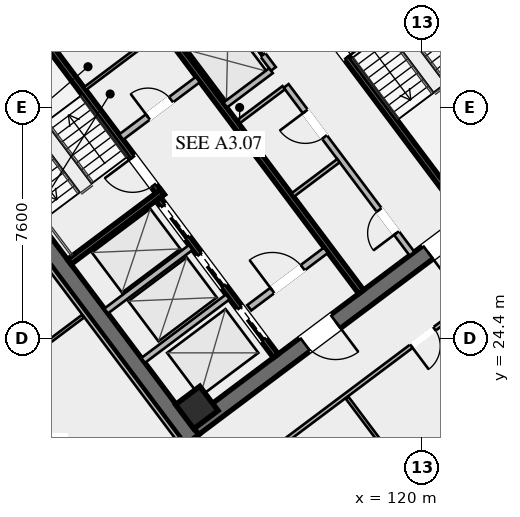
"""IFC4 building model, lengths in metres.
Left out: names, types, materials, properties, quantities, classifications, styles, units other than length and angle.
Written with IfcOpenShell. Run it as: python <this file> out.ifc"""

import sys

from ifc_helpers import new_model, si_unit, direction, frame, frame_2d, origin, origin_2d, place, context, subcontext, project, spatial, rectangle, hollow_rectangle, extrude, element, fill, save


model = new_model("IFC4")
c1 = context("Model", 3, precision=1e-05, world=origin(), true_north=direction((0.0, 1.0)))
c2 = subcontext(c1, "Body", "Model", "MODEL_VIEW")
j1 = project(units=[si_unit("LENGTHUNIT", "METRE"), si_unit("PLANEANGLEUNIT", "RADIAN")], contexts=[c1])
p1 = place(None, origin())
s1 = spatial("IfcSite", under=j1, at=p1, CompositionType="ELEMENT")
p2 = place(p1, origin())
s2 = spatial("IfcBuilding", under=s1, at=p2, CompositionType="ELEMENT")
p3 = place(p2, frame((0.0, 0.0, 157.0)))
s3 = spatial("IfcBuildingStorey", under=s2, at=p3, CompositionType="ELEMENT", Elevation=157.0)
for number, where, z_axis, x_axis in (
    (1, (112.436, 21.077, 0.0), (0.0, 0.0, 1.0), (-0.6, 0.8, 0.0)),
    (2, (115.564, 42.923, 0.0), (0.0, 0.0, 1.0), (0.6, -0.8, 0.0)),
):
    element("IfcWall", number, at=place(p3, frame(where, z_axis=z_axis, x_axis=x_axis)), inside=s3, PredefinedType="SHEAR", context=c2, shape_type="SweptSolid", body=[
        extrude(rectangle(XDim=15.6, YDim=0.55, at=frame_2d((7.8, 0.0))), origin(), (0.0, 0.0, 1.0), 3.55),
    ])
p4 = place(p3, frame((124.539, 30.498, 0.0), z_axis=(0.0, 0.0, 1.0), x_axis=(-0.799998054672, -0.600002593761, 0.0)))
e3 = element("IfcWall", 3, at=p4, inside=s3, PredefinedType="SHEAR", context=c2, shape_type="SweptSolid", body=[
    extrude(rectangle(XDim=15.06, YDim=0.55, at=frame_2d((7.53, 0.0))), origin(), (0.0, 0.0, 1.0), 3.55),
])
p5 = place(p4, frame((9.23, 0.0, 0.0)))
e4 = element("IfcOpeningElement", 4, at=p5, cuts=e3, PredefinedType="OPENING", context=c2, shape_type="SweptSolid", body=[
    extrude(rectangle(XDim=1.25, YDim=2.25, at=frame_2d((0.625, 1.125))), frame((0.0, 0.285, 0.0), z_axis=(0.0, -1.0, 0.0), x_axis=(1.0, 0.0, 0.0)), (0.0, 0.0, 1.0), 0.57),
])
p6 = place(p4, frame((4.18, 0.0, 0.0)))
e5 = element("IfcOpeningElement", 5, at=p6, cuts=e3, PredefinedType="OPENING", context=c2, shape_type="SweptSolid", body=[
    extrude(rectangle(XDim=1.25, YDim=2.25, at=frame_2d((0.625, 1.125))), frame((0.0, 0.285, 0.0), z_axis=(0.0, -1.0, 0.0), x_axis=(1.0, 0.0, 0.0)), (0.0, 0.0, 1.0), 0.57),
])
p7 = place(p3, frame((103.461, 33.502, 0.0), z_axis=(0.0, 0.0, 1.0), x_axis=(0.799998054672, 0.600002593761, 0.0)))
e6 = element("IfcWall", 6, at=p7, inside=s3, PredefinedType="SHEAR", context=c2, shape_type="SweptSolid", body=[
    extrude(rectangle(XDim=15.06, YDim=0.55, at=frame_2d((7.53, 0.0))), origin(), (0.0, 0.0, 1.0), 3.55),
])
p8 = place(p7, frame((4.58, 0.0, 0.0)))
e7 = element("IfcOpeningElement", 7, at=p8, cuts=e6, PredefinedType="OPENING", context=c2, shape_type="SweptSolid", body=[
    extrude(rectangle(XDim=1.25, YDim=2.25, at=frame_2d((0.625, 1.125))), frame((0.0, 0.285, 0.0), z_axis=(0.0, -1.0, 0.0), x_axis=(1.0, 0.0, 0.0)), (0.0, 0.0, 1.0), 0.57),
])
p9 = place(p7, frame((9.63, 0.0, 0.0)))
e8 = element("IfcOpeningElement", 8, at=p9, cuts=e6, PredefinedType="OPENING", context=c2, shape_type="SweptSolid", body=[
    extrude(rectangle(XDim=1.25, YDim=2.25, at=frame_2d((0.625, 1.125))), frame((0.0, 0.285, 0.0), z_axis=(0.0, -1.0, 0.0), x_axis=(1.0, 0.0, 0.0)), (0.0, 0.0, 1.0), 0.57),
])
p10 = place(p3, frame((112.59, 22.13, 0.0), z_axis=(0.0, 0.0, 1.0), x_axis=(0.799999996291, 0.600000004945, 0.0)))
e9 = element("IfcColumn", 9, at=p10, inside=s3, PredefinedType="COLUMN", context=c2, shape_type="SweptSolid", body=[
    extrude(hollow_rectangle(XDim=1.0, YDim=1.0, WallThickness=0.04, at=origin_2d()), origin(), (0.0, 0.0, 1.0), 3.37),
])
p11 = place(p3, frame((111.44, 29.08, 0.0), z_axis=(0.0, 0.0, 1.0), x_axis=(-0.59999029481, 0.8000072788, 0.0)))
e10 = element("IfcWall", 10, at=p11, inside=s3, PredefinedType="SHEAR", context=c2, shape_type="SweptSolid", body=[
    extrude(rectangle(XDim=8.05, YDim=0.2, at=frame_2d((4.025, 0.0))), origin(), (0.0, 0.0, 1.0), 3.37),
])
p12 = place(p11, frame((0.45, 0.0, 0.0)))
e11 = element("IfcOpeningElement", 11, at=p12, cuts=e10, PredefinedType="OPENING", context=c2, shape_type="SweptSolid", body=[
    extrude(rectangle(XDim=1.15, YDim=2.2, at=frame_2d((0.575, 1.1))), frame((0.0, 0.11, 0.0), z_axis=(0.0, -1.0, 0.0), x_axis=(1.0, 0.0, 0.0)), (0.0, 0.0, 1.0), 0.22),
])
p13 = place(p3, frame((108.396, 26.922, 0.0), z_axis=(0.0, 0.0, 1.0), x_axis=(0.800015298837, 0.599979601008, 0.0)))
e12 = element("IfcWall", 12, at=p13, inside=s3, PredefinedType="SHEAR", context=c2, shape_type="SweptSolid", body=[
    extrude(rectangle(XDim=3.83, YDim=0.2, at=frame_2d((1.915, 0.0))), origin(), (0.0, 0.0, 1.0), 3.37),
])
p14 = place(p3, frame((116.56, 34.92, 0.0), z_axis=(0.0, 0.0, 1.0), x_axis=(0.59999029481, -0.8000072788, 0.0)))
e13 = element("IfcWall", 13, at=p14, inside=s3, PredefinedType="SHEAR", context=c2, shape_type="SweptSolid", body=[
    extrude(rectangle(XDim=8.05, YDim=0.2, at=frame_2d((4.025, 0.0))), origin(), (0.0, 0.0, 1.0), 3.37),
])
p15 = place(p14, frame((0.45, 0.0, 0.0)))
e14 = element("IfcOpeningElement", 14, at=p15, cuts=e13, PredefinedType="OPENING", context=c2, shape_type="SweptSolid", body=[
    extrude(rectangle(XDim=1.15, YDim=2.2, at=frame_2d((0.575, 1.1))), frame((0.0, 0.11, 0.0), z_axis=(0.0, -1.0, 0.0), x_axis=(1.0, 0.0, 0.0)), (0.0, 0.0, 1.0), 0.22),
])
p16 = place(p3, frame((117.998, 25.936, 0.0), z_axis=(0.0, 0.0, 1.0), x_axis=(-0.600002693989, 0.799997979501, 0.0)))
e15 = element("IfcWall", 15, at=p16, inside=s3, PredefinedType="SHEAR", context=c2, shape_type="SweptSolid", body=[
    extrude(rectangle(XDim=14.5, YDim=0.2, at=frame_2d((7.25, 0.0))), origin(), (0.0, 0.0, 1.0), 3.37),
])
p17 = place(p3, frame((110.104, 31.028, 0.0), z_axis=(0.0, 0.0, 1.0), x_axis=(0.800018601094, 0.59997519774, 0.0)))
e16 = element("IfcWall", 16, at=p17, inside=s3, PredefinedType="SOLIDWALL", context=c2, shape_type="SweptSolid", body=[
    extrude(rectangle(XDim=3.15, YDim=0.22, at=frame_2d((1.575, 0.0))), origin(), (0.0, 0.0, 1.0), 2.723),
])
p18 = place(p17, frame((1.1, 0.0, 0.0)))
e17 = element("IfcOpeningElement", 17, at=p18, cuts=e16, PredefinedType="OPENING", context=c2, shape_type="SweptSolid", body=[
    extrude(rectangle(XDim=0.95, YDim=2.05, at=frame_2d((0.475, 1.025))), frame((0.0, 0.12, 0.0), z_axis=(0.0, -1.0, 0.0), x_axis=(1.0, 0.0, 0.0)), (0.0, 0.0, 1.0), 0.24),
])
p19 = place(p3, frame((114.316, 25.412, 0.0), z_axis=(0.0, 0.0, 1.0), x_axis=(0.800018601094, 0.59997519774, 0.0)))
e18 = element("IfcWall", 18, at=p19, inside=s3, PredefinedType="SOLIDWALL", context=c2, shape_type="SweptSolid", body=[
    extrude(rectangle(XDim=3.15, YDim=0.22, at=frame_2d((1.575, 0.0))), origin(), (0.0, 0.0, 1.0), 2.723),
])
p20 = place(p19, frame((0.95, 0.0, 0.0)))
e19 = element("IfcOpeningElement", 19, at=p20, cuts=e18, PredefinedType="OPENING", context=c2, shape_type="SweptSolid", body=[
    extrude(rectangle(XDim=1.25, YDim=2.25, at=frame_2d((0.625, 1.125))), frame((0.0, 0.12, 0.0), z_axis=(0.0, -1.0, 0.0), x_axis=(1.0, 0.0, 0.0)), (0.0, 0.0, 1.0), 0.24),
])
p21 = place(p3, frame((115.19, 23.83, 0.0), z_axis=(0.0, 0.0, 1.0), x_axis=(-0.599993943644, 0.800004542231, 0.0)))
e20 = element("IfcWall", 20, at=p21, inside=s3, PredefinedType="SHEAR", context=c2, shape_type="SweptSolid", body=[
    extrude(rectangle(XDim=6.45, YDim=0.2, at=frame_2d((3.225, 0.0))), origin(), (0.0, 0.0, 1.0), 3.37),
])
p22 = place(p21, frame((4.875, 0.0, 0.0)))
e21 = element("IfcOpeningElement", 21, at=p22, cuts=e20, PredefinedType="OPENING", context=c2, shape_type="SweptSolid", body=[
    extrude(rectangle(XDim=1.3, YDim=2.25, at=frame_2d((0.65, 1.125))), frame((0.0, 0.11, 0.0), z_axis=(0.0, -1.0, 0.0), x_axis=(1.0, 0.0, 0.0)), (0.0, 0.0, 1.0), 0.22),
])
p23 = place(p21, frame((2.875, 0.0, 0.0)))
e22 = element("IfcOpeningElement", 22, at=p23, cuts=e20, PredefinedType="OPENING", context=c2, shape_type="SweptSolid", body=[
    extrude(rectangle(XDim=1.3, YDim=2.25, at=frame_2d((0.65, 1.125))), frame((0.0, 0.11, 0.0), z_axis=(0.0, -1.0, 0.0), x_axis=(1.0, 0.0, 0.0)), (0.0, 0.0, 1.0), 0.22),
])
p24 = place(p21, frame((0.675, 0.0, 0.0)))
e23 = element("IfcOpeningElement", 23, at=p24, cuts=e20, PredefinedType="OPENING", context=c2, shape_type="SweptSolid", body=[
    extrude(rectangle(XDim=1.3, YDim=2.25, at=frame_2d((0.65, 1.125))), frame((0.0, 0.11, 0.0), z_axis=(0.0, -1.0, 0.0), x_axis=(1.0, 0.0, 0.0)), (0.0, 0.0, 1.0), 0.22),
])
for number, where, z_axis, x_axis in (
    (24, (110.826, 23.682, 0.0), (0.0, 0.0, 1.0), (0.8, 0.6, 0.0)),
    (25, (109.608, 25.306, 0.0), (0.0, 0.0, 1.0), (0.8, 0.6, 0.0)),
):
    element("IfcWall", number, at=place(p3, frame(where, z_axis=z_axis, x_axis=x_axis)), inside=s3, PredefinedType="SOLIDWALL", context=c2, shape_type="SweptSolid", body=[
        extrude(rectangle(XDim=3.48, YDim=0.2, at=frame_2d((1.74, 0.0))), origin(), (0.0, 0.0, 1.0), 3.37),
    ])
p25 = place(p3, frame((108.91, 32.62, 0.0), z_axis=(0.0, 0.0, 1.0), x_axis=(0.800018601094, 0.59997519774, 0.0)))
e26 = element("IfcWall", 26, at=p25, inside=s3, PredefinedType="PARTITIONING", context=c2, shape_type="SweptSolid", body=[
    extrude(rectangle(XDim=3.15, YDim=0.11, at=frame_2d((1.575, 0.0))), origin(), (0.0, 0.0, 1.0), 2.723),
])
p26 = place(p3, frame((119.67, 27.19, 0.0), z_axis=(0.0, 0.0, 1.0), x_axis=(-0.599988677396, 0.800008491828, 0.0)))
e27 = element("IfcWall", 27, at=p26, inside=s3, PredefinedType="SOLIDWALL", context=c2, shape_type="SweptSolid", body=[
    extrude(rectangle(XDim=6.9, YDim=0.2, at=frame_2d((3.45, 0.0))), origin(), (0.0, 0.0, 1.0), 2.723),
])
p27 = place(p26, frame((0.85, 0.0, 0.0)))
e28 = element("IfcOpeningElement", 28, at=p27, cuts=e27, PredefinedType="OPENING", context=c2, shape_type="SweptSolid", body=[
    extrude(rectangle(XDim=0.95, YDim=2.05, at=frame_2d((0.475, 1.025))), frame((0.0, 0.11, 0.0), z_axis=(0.0, -1.0, 0.0), x_axis=(1.0, 0.0, 0.0)), (0.0, 0.0, 1.0), 0.22),
])
p28 = place(p26, frame((4.8, 0.0, 0.0)))
e29 = element("IfcOpeningElement", 29, at=p28, cuts=e27, PredefinedType="OPENING", context=c2, shape_type="SweptSolid", body=[
    extrude(rectangle(XDim=1.05, YDim=2.2, at=frame_2d((0.525, 1.1))), frame((0.0, 0.11, 0.0), z_axis=(0.0, -1.0, 0.0), x_axis=(1.0, 0.0, 0.0)), (0.0, 0.0, 1.0), 0.22),
])
for number, where, z_axis, x_axis in (
    (30, (113.946, 31.522, 0.0), (0.0, 0.0, 1.0), (0.8, 0.6, 0.0)),
    (31, (115.746, 29.122, 0.0), (0.0, 0.0, 1.0), (0.8, 0.6, 0.0)),
):
    element("IfcWall", number, at=place(p3, frame(where, z_axis=z_axis, x_axis=x_axis)), inside=s3, PredefinedType="PARTITIONING", context=c2, shape_type="SweptSolid", body=[
        extrude(rectangle(XDim=1.88, YDim=0.135, at=frame_2d((0.94, 0.0))), origin(), (0.0, 0.0, 1.0), 2.723),
    ])
p29 = place(p3, frame((115.11, 33.27, 0.0), z_axis=(0.0, 0.0, 1.0), x_axis=(-0.600011322243, 0.799991508192, 0.0)))
e32 = element("IfcWall", 32, at=p29, inside=s3, PredefinedType="SOLIDWALL", context=c2, shape_type="SweptSolid", body=[
    extrude(rectangle(XDim=6.9, YDim=0.2, at=frame_2d((3.45, 0.0))), origin(), (0.0, 0.0, 1.0), 3.37),
])
p30 = place(p29, frame((0.575, 0.0, 0.0)))
e33 = element("IfcOpeningElement", 33, at=p30, cuts=e32, PredefinedType="OPENING", context=c2, shape_type="SweptSolid", body=[
    extrude(rectangle(XDim=1.1, YDim=2.2, at=frame_2d((0.55, 1.1))), frame((0.0, 0.11, 0.0), z_axis=(0.0, -1.0, 0.0), x_axis=(1.0, 0.0, 0.0)), (0.0, 0.0, 1.0), 0.22),
])
p31 = place(p29, frame((2.825, 0.0, 0.0)))
e34 = element("IfcOpeningElement", 34, at=p31, cuts=e32, PredefinedType="OPENING", context=c2, shape_type="SweptSolid", body=[
    extrude(rectangle(XDim=1.1, YDim=2.2, at=frame_2d((0.55, 1.1))), frame((0.0, 0.11, 0.0), z_axis=(0.0, -1.0, 0.0), x_axis=(1.0, 0.0, 0.0)), (0.0, 0.0, 1.0), 0.22),
])
p32 = place(p29, frame((5.075, 0.0, 0.0)))
e35 = element("IfcOpeningElement", 35, at=p32, cuts=e32, PredefinedType="OPENING", context=c2, shape_type="SweptSolid", body=[
    extrude(rectangle(XDim=1.1, YDim=2.2, at=frame_2d((0.55, 1.1))), frame((0.0, 0.11, 0.0), z_axis=(0.0, -1.0, 0.0), x_axis=(1.0, 0.0, 0.0)), (0.0, 0.0, 1.0), 0.22),
])
p33 = place(p3, frame((113.526, 32.082, 0.0), z_axis=(0.0, 0.0, 1.0), x_axis=(0.800046745961, 0.599937666993, 0.0)))
e36 = element("IfcWall", 36, at=p33, inside=s3, PredefinedType="SOLIDWALL", context=c2, shape_type="SweptSolid", body=[
    extrude(rectangle(XDim=1.88, YDim=0.2, at=frame_2d((0.94, 0.0))), origin(), (0.0, 0.0, 1.0), 3.37),
])
p34 = place(p3, frame((112.176, 33.882, 0.0), z_axis=(0.0, 0.0, 1.0), x_axis=(0.8, 0.6, 0.0)))
e37 = element("IfcWall", 37, at=p34, inside=s3, PredefinedType="SOLIDWALL", context=c2, shape_type="SweptSolid", body=[
    extrude(rectangle(XDim=1.88, YDim=0.2, at=frame_2d((0.94, 0.0))), origin(), (0.0, 0.0, 1.0), 3.37),
])
p35 = place(p3, frame((95.8, 32.35, 0.0), z_axis=(0.0, 0.0, 1.0), x_axis=(0.8, 0.6, 0.0)))
e38 = element("IfcWall", 38, at=p35, inside=s3, PredefinedType="PARTITIONING", context=c2, shape_type="SweptSolid", body=[
    extrude(rectangle(XDim=28.7, YDim=0.135, at=frame_2d((14.35, 0.0))), origin(), (0.0, 0.0, 1.0), 2.723),
])
p36 = place(p35, frame((0.3, 0.0, 0.0)))
e39 = element("IfcOpeningElement", 39, at=p36, cuts=e38, PredefinedType="OPENING", context=c2, shape_type="SweptSolid", body=[
    extrude(rectangle(XDim=0.95, YDim=2.05, at=frame_2d((0.475, 1.025))), frame((0.0, 0.077, 0.0), z_axis=(0.0, -1.0, 0.0), x_axis=(1.0, 0.0, 0.0)), (0.0, 0.0, 1.0), 0.155),
])
p37 = place(p35, frame((9.959, 0.0, 0.0)))
e40 = element("IfcOpeningElement", 40, at=p37, cuts=e38, PredefinedType="OPENING", context=c2, shape_type="SweptSolid", body=[
    extrude(rectangle(XDim=0.95, YDim=2.05, at=frame_2d((0.475, 1.025))), frame((0.0, 0.077, 0.0), z_axis=(0.0, -1.0, 0.0), x_axis=(1.0, 0.0, 0.0)), (0.0, 0.0, 1.0), 0.155),
])
p38 = place(p35, frame((14.005, 0.0, 0.0)))
e41 = element("IfcOpeningElement", 41, at=p38, cuts=e38, PredefinedType="OPENING", context=c2, shape_type="SweptSolid", body=[
    extrude(rectangle(XDim=0.95, YDim=2.05, at=frame_2d((0.475, 1.025))), frame((0.0, 0.077, 0.0), z_axis=(0.0, -1.0, 0.0), x_axis=(1.0, 0.0, 0.0)), (0.0, 0.0, 1.0), 0.155),
])
p39 = place(p35, frame((18.049, 0.0, 0.0)))
e42 = element("IfcOpeningElement", 42, at=p39, cuts=e38, PredefinedType="OPENING", context=c2, shape_type="SweptSolid", body=[
    extrude(rectangle(XDim=0.95, YDim=2.05, at=frame_2d((0.475, 1.025))), frame((0.0, 0.077, 0.0), z_axis=(0.0, -1.0, 0.0), x_axis=(1.0, 0.0, 0.0)), (0.0, 0.0, 1.0), 0.155),
])
p40 = place(p35, frame((27.45, 0.0, 0.0)))
e43 = element("IfcOpeningElement", 43, at=p40, cuts=e38, PredefinedType="OPENING", context=c2, shape_type="SweptSolid", body=[
    extrude(rectangle(XDim=0.95, YDim=2.05, at=frame_2d((0.475, 1.025))), frame((0.0, 0.077, 0.0), z_axis=(0.0, -1.0, 0.0), x_axis=(1.0, 0.0, 0.0)), (0.0, 0.0, 1.0), 0.155),
])
p41 = place(p3, frame((131.282, 32.874, 0.0), z_axis=(0.0, 0.0, 1.0), x_axis=(-0.8, -0.6, 0.0)))
e44 = element("IfcWall", 44, at=p41, inside=s3, PredefinedType="PARTITIONING", context=c2, shape_type="SweptSolid", body=[
    extrude(rectangle(XDim=28.7, YDim=0.135, at=frame_2d((14.35, 0.0))), origin(), (0.0, 0.0, 1.0), 2.723),
])
p42 = place(p41, frame((27.37, 0.0, 0.0)))
e45 = element("IfcOpeningElement", 45, at=p42, cuts=e44, PredefinedType="OPENING", context=c2, shape_type="SweptSolid", body=[
    extrude(rectangle(XDim=0.95, YDim=2.05, at=frame_2d((0.475, 1.025))), frame((0.0, 0.077, 0.0), z_axis=(0.0, -1.0, 0.0), x_axis=(1.0, 0.0, 0.0)), (0.0, 0.0, 1.0), 0.155),
])
p43 = place(p41, frame((13.592, 0.0, 0.0)))
e46 = element("IfcOpeningElement", 46, at=p43, cuts=e44, PredefinedType="OPENING", context=c2, shape_type="SweptSolid", body=[
    extrude(rectangle(XDim=0.95, YDim=2.05, at=frame_2d((0.475, 1.025))), frame((0.0, 0.077, 0.0), z_axis=(0.0, -1.0, 0.0), x_axis=(1.0, 0.0, 0.0)), (0.0, 0.0, 1.0), 0.155),
])
p44 = place(p41, frame((0.38, 0.0, 0.0)))
e47 = element("IfcOpeningElement", 47, at=p44, cuts=e44, PredefinedType="OPENING", context=c2, shape_type="SweptSolid", body=[
    extrude(rectangle(XDim=0.95, YDim=2.05, at=frame_2d((0.475, 1.025))), frame((0.0, 0.077, 0.0), z_axis=(0.0, -1.0, 0.0), x_axis=(1.0, 0.0, 0.0)), (0.0, 0.0, 1.0), 0.155),
])
p45 = place(p3, frame((121.748, 16.836, 0.0), z_axis=(0.0, 0.0, 1.0), x_axis=(-0.6, 0.8, 0.0)))
e48 = element("IfcWall", 48, at=p45, inside=s3, PredefinedType="PARTITIONING", context=c2, shape_type="SweptSolid", body=[
    extrude(rectangle(XDim=7.03, YDim=0.11, at=frame_2d((3.515, 0.0))), origin(), (0.0, 0.0, 1.0), 2.723),
])
p46 = place(p3, frame((112.104, 20.928, 0.0), z_axis=(0.0, 0.0, 1.0), x_axis=(-0.599994940075, 0.800003794918, 0.0)))
e49 = element("IfcWall", 49, at=p46, inside=s3, PredefinedType="PARTITIONING", context=c2, shape_type="SweptSolid", body=[
    extrude(rectangle(XDim=15.44, YDim=0.135, at=frame_2d((7.72, 0.0))), origin(), (0.0, 0.0, 1.0), 2.723),
])
p47 = place(p3, frame((102.016, 20.012, 0.0), z_axis=(0.0, 0.0, 1.0), x_axis=(0.799989708052, 0.600013722352, 0.0)))
e50 = element("IfcWall", 50, at=p47, inside=s3, PredefinedType="PARTITIONING", context=c2, shape_type="SweptSolid", body=[
    extrude(rectangle(XDim=8.54, YDim=0.11, at=frame_2d((4.27, 0.0))), origin(), (0.0, 0.0, 1.0), 2.723),
])
p48 = place(p5, origin())
e51 = element("IfcDoor", 51, at=p48, inside=s3, OperationType="SINGLE_SWING_LEFT", PredefinedType="DOOR", context=c2, shape_type="SweptSolid", body=[
    extrude(rectangle(XDim=1.25, YDim=2.25, at=frame_2d((0.625, 1.125))), frame((0.0, 0.025, 0.0), z_axis=(0.0, -1.0, 0.0), x_axis=(1.0, 0.0, 0.0)), (0.0, 0.0, 1.0), 0.05),
])
fill(e4, e51)
p49 = place(p6, origin())
e52 = element("IfcDoor", 52, at=p49, inside=s3, OperationType="SINGLE_SWING_RIGHT", PredefinedType="DOOR", context=c2, shape_type="SweptSolid", body=[
    extrude(rectangle(XDim=1.25, YDim=2.25, at=frame_2d((0.625, 1.125))), frame((0.0, 0.025, 0.0), z_axis=(0.0, -1.0, 0.0), x_axis=(1.0, 0.0, 0.0)), (0.0, 0.0, 1.0), 0.05),
])
fill(e5, e52)
p50 = place(p12, origin())
e53 = element("IfcDoor", 53, at=p50, inside=s3, OperationType="SINGLE_SWING_RIGHT", PredefinedType="DOOR", context=c2, shape_type="SweptSolid", body=[
    extrude(rectangle(XDim=1.15, YDim=2.2, at=frame_2d((0.575, 1.1))), frame((0.0, 0.025, 0.0), z_axis=(0.0, -1.0, 0.0), x_axis=(1.0, 0.0, 0.0)), (0.0, 0.0, 1.0), 0.05),
])
fill(e11, e53)
p51 = place(p15, origin())
e54 = element("IfcDoor", 54, at=p51, inside=s3, OperationType="SINGLE_SWING_RIGHT", PredefinedType="DOOR", context=c2, shape_type="SweptSolid", body=[
    extrude(rectangle(XDim=1.15, YDim=2.2, at=frame_2d((0.575, 1.1))), frame((0.0, 0.025, 0.0), z_axis=(0.0, -1.0, 0.0), x_axis=(1.0, 0.0, 0.0)), (0.0, 0.0, 1.0), 0.05),
])
fill(e14, e54)
p52 = place(p20, origin())
e55 = element("IfcDoor", 55, at=p52, inside=s3, OperationType="SINGLE_SWING_LEFT", PredefinedType="DOOR", context=c2, shape_type="SweptSolid", body=[
    extrude(rectangle(XDim=1.25, YDim=2.25, at=frame_2d((0.625, 1.125))), frame((0.0, 0.025, 0.0), z_axis=(0.0, -1.0, 0.0), x_axis=(1.0, 0.0, 0.0)), (0.0, 0.0, 1.0), 0.05),
])
fill(e19, e55)
p53 = place(p18, origin())
e56 = element("IfcDoor", 56, at=p53, inside=s3, OperationType="SINGLE_SWING_LEFT", PredefinedType="DOOR", context=c2, shape_type="SweptSolid", body=[
    extrude(rectangle(XDim=0.95, YDim=2.05, at=frame_2d((0.475, 1.025))), frame((0.0, 0.025, 0.0), z_axis=(0.0, -1.0, 0.0), x_axis=(1.0, 0.0, 0.0)), (0.0, 0.0, 1.0), 0.05),
])
fill(e17, e56)
p54 = place(p27, origin())
e57 = element("IfcDoor", 57, at=p54, inside=s3, OperationType="SINGLE_SWING_LEFT", PredefinedType="DOOR", context=c2, shape_type="SweptSolid", body=[
    extrude(rectangle(XDim=0.95, YDim=2.05, at=frame_2d((0.475, 1.025))), frame((0.0, 0.025, 0.0), z_axis=(0.0, -1.0, 0.0), x_axis=(1.0, 0.0, 0.0)), (0.0, 0.0, 1.0), 0.05),
])
fill(e28, e57)
p55 = place(p28, origin())
e58 = element("IfcDoor", 58, at=p55, inside=s3, OperationType="SINGLE_SWING_RIGHT", PredefinedType="DOOR", context=c2, shape_type="SweptSolid", body=[
    extrude(rectangle(XDim=1.05, YDim=2.2, at=frame_2d((0.525, 1.1))), frame((0.0, 0.025, 0.0), z_axis=(0.0, -1.0, 0.0), x_axis=(1.0, 0.0, 0.0)), (0.0, 0.0, 1.0), 0.05),
])
fill(e29, e58)
p56 = place(p43, origin())
e59 = element("IfcDoor", 59, at=p56, inside=s3, OperationType="SINGLE_SWING_RIGHT", PredefinedType="DOOR", context=c2, shape_type="SweptSolid", body=[
    extrude(rectangle(XDim=0.95, YDim=2.05, at=frame_2d((0.475, 1.025))), frame((0.0, 0.025, 0.0), z_axis=(0.0, -1.0, 0.0), x_axis=(1.0, 0.0, 0.0)), (0.0, 0.0, 1.0), 0.05),
])
fill(e46, e59)
p57 = place(p22, origin())
e60 = element("IfcDoor", 60, at=p57, inside=s3, OperationType="SLIDING_TO_LEFT", PredefinedType="DOOR", context=c2, shape_type="SweptSolid", body=[
    extrude(rectangle(XDim=1.3, YDim=2.25, at=frame_2d((0.65, 1.125))), frame((0.0, 0.025, 0.0), z_axis=(0.0, -1.0, 0.0), x_axis=(1.0, 0.0, 0.0)), (0.0, 0.0, 1.0), 0.05),
])
fill(e21, e60)
p58 = place(p23, origin())
e61 = element("IfcDoor", 61, at=p58, inside=s3, OperationType="SLIDING_TO_LEFT", PredefinedType="DOOR", context=c2, shape_type="SweptSolid", body=[
    extrude(rectangle(XDim=1.3, YDim=2.25, at=frame_2d((0.65, 1.125))), frame((0.0, 0.025, 0.0), z_axis=(0.0, -1.0, 0.0), x_axis=(1.0, 0.0, 0.0)), (0.0, 0.0, 1.0), 0.05),
])
fill(e22, e61)
p59 = place(p24, origin())
e62 = element("IfcDoor", 62, at=p59, inside=s3, OperationType="SLIDING_TO_LEFT", PredefinedType="DOOR", context=c2, shape_type="SweptSolid", body=[
    extrude(rectangle(XDim=1.3, YDim=2.25, at=frame_2d((0.65, 1.125))), frame((0.0, 0.025, 0.0), z_axis=(0.0, -1.0, 0.0), x_axis=(1.0, 0.0, 0.0)), (0.0, 0.0, 1.0), 0.05),
])
fill(e23, e62)
p60 = place(p30, origin())
e63 = element("IfcDoor", 63, at=p60, inside=s3, OperationType="SLIDING_TO_LEFT", PredefinedType="DOOR", context=c2, shape_type="SweptSolid", body=[
    extrude(rectangle(XDim=1.1, YDim=2.2, at=frame_2d((0.55, 1.1))), frame((0.0, 0.025, 0.0), z_axis=(0.0, -1.0, 0.0), x_axis=(1.0, 0.0, 0.0)), (0.0, 0.0, 1.0), 0.05),
])
fill(e33, e63)
save(model, sys.argv[1])
